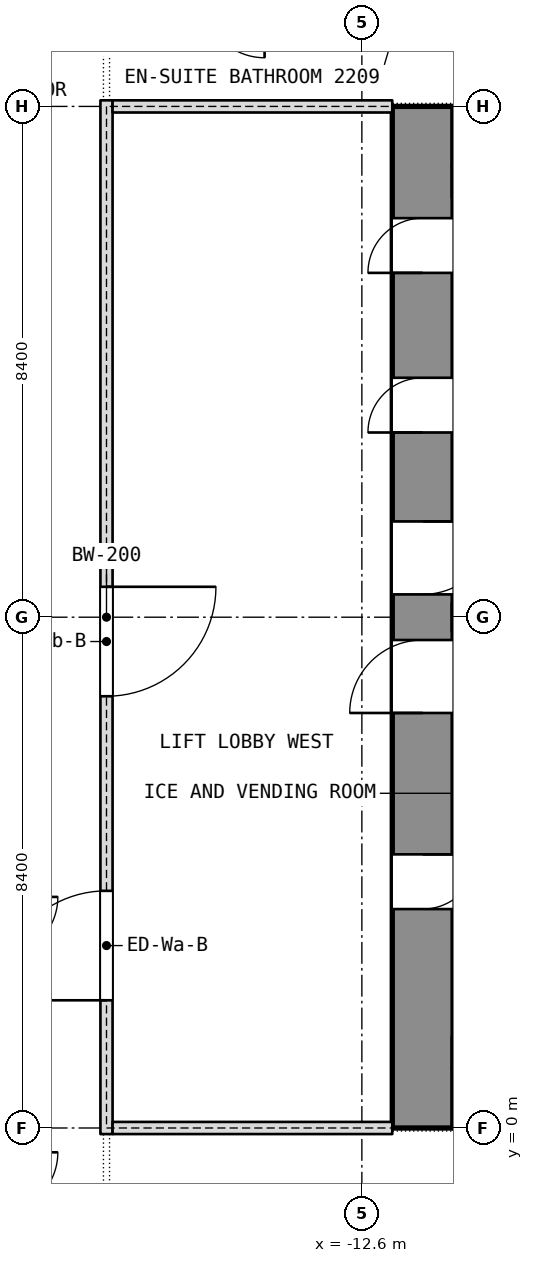
"""IFC4 building model, lengths in metres.
Left out: names, types, materials, properties, quantities, classifications, styles, units other than length and angle.
Written with IfcOpenShell. Run it as: python <this file> out.ifc"""

import sys

from ifc_helpers import new_model, si_unit, direction, frame, frame_2d, origin, place, context, subcontext, project, spatial, rectangle, extrude, element, fill, save


model = new_model("IFC4")
c1 = context("Model", 3, precision=1e-05, world=origin(), true_north=direction((0.0, 1.0)))
c2 = subcontext(c1, "Body", "Model", "MODEL_VIEW")
j1 = project(units=[si_unit("LENGTHUNIT", "METRE"), si_unit("PLANEANGLEUNIT", "RADIAN")], contexts=[c1])
p1 = place(None, origin())
s1 = spatial("IfcSite", under=j1, at=p1, CompositionType="ELEMENT")
p2 = place(p1, origin())
s2 = spatial("IfcBuilding", under=s1, at=p2, CompositionType="ELEMENT")
p3 = place(p2, frame((0.0, 0.0, 104.9)))
s3 = spatial("IfcBuildingStorey", under=s2, at=p3, CompositionType="ELEMENT", Elevation=104.9)
p4 = place(p3, frame((-11.6, 0.0, 0.0), z_axis=(0.0, 0.0, 1.0), x_axis=(0.0, 1.0, 0.0)))
e1 = element("IfcWall", 1, at=p4, inside=s3, PredefinedType="SHEAR", context=c2, shape_type="SweptSolid", body=[
    extrude(rectangle(XDim=16.8, YDim=1.0, at=frame_2d((8.4, 0.0))), origin(), (0.0, 0.0, 1.0), 3.6),
])
p5 = place(p4, frame((3.6, 0.0, 0.0)))
e2 = element("IfcOpeningElement", 2, at=p5, cuts=e1, PredefinedType="OPENING", context=c2, shape_type="SweptSolid", body=[
    extrude(rectangle(XDim=0.9, YDim=2.1, at=frame_2d((0.45, 1.05))), frame((0.0, 0.5, 0.0), z_axis=(0.0, -1.0, 0.0), x_axis=(1.0, 0.0, 0.0)), (0.0, 0.0, 1.0), 1.0),
])
p6 = place(p4, frame((6.825, 0.0, 0.0)))
e3 = element("IfcOpeningElement", 3, at=p6, cuts=e1, PredefinedType="OPENING", context=c2, shape_type="SweptSolid", body=[
    extrude(rectangle(XDim=1.2, YDim=2.1, at=frame_2d((0.6, 1.05))), frame((0.0, 0.5, 0.0), z_axis=(0.0, -1.0, 0.0), x_axis=(1.0, 0.0, 0.0)), (0.0, 0.0, 1.0), 1.0),
])
p7 = place(p4, frame((14.062, 0.0, 0.0)))
e4 = element("IfcOpeningElement", 4, at=p7, cuts=e1, PredefinedType="OPENING", context=c2, shape_type="SweptSolid", body=[
    extrude(rectangle(XDim=0.9, YDim=2.1, at=frame_2d((0.45, 1.05))), frame((0.0, 0.5, 0.0), z_axis=(0.0, -1.0, 0.0), x_axis=(1.0, 0.0, 0.0)), (0.0, 0.0, 1.0), 1.0),
])
p8 = place(p4, frame((11.438, 0.0, 0.0)))
e5 = element("IfcOpeningElement", 5, at=p8, cuts=e1, PredefinedType="OPENING", context=c2, shape_type="SweptSolid", body=[
    extrude(rectangle(XDim=0.9, YDim=2.1, at=frame_2d((0.45, 1.05))), frame((0.0, 0.5, 0.0), z_axis=(0.0, -1.0, 0.0), x_axis=(1.0, 0.0, 0.0)), (0.0, 0.0, 1.0), 1.0),
])
p9 = place(p4, frame((8.775, 0.0, 0.0)))
e6 = element("IfcOpeningElement", 6, at=p9, cuts=e1, PredefinedType="OPENING", context=c2, shape_type="SweptSolid", body=[
    extrude(rectangle(XDim=1.2, YDim=2.1, at=frame_2d((0.6, 1.05))), frame((0.0, 0.5, 0.0), z_axis=(0.0, -1.0, 0.0), x_axis=(1.0, 0.0, 0.0)), (0.0, 0.0, 1.0), 1.0),
])
p10 = place(p3, frame((-11.1, 8.4, 0.0), z_axis=(0.0, 0.0, 1.0), x_axis=(1.0, 0.0, 0.0)))
e7 = element("IfcWall", 7, at=p10, inside=s3, PredefinedType="SHEAR", context=c2, shape_type="SweptSolid", body=[
    extrude(rectangle(XDim=6.675, YDim=0.45, at=frame_2d((3.337, 0.0))), origin(), (0.0, 0.0, 1.0), 3.6),
])
p11 = place(p3, frame((-16.8, -0.1, 0.0), z_axis=(0.0, 0.0, 1.0), x_axis=(0.0, 1.0, 0.0)))
e8 = element("IfcWall", 8, at=p11, inside=s3, PredefinedType="PARTITIONING", context=c2, shape_type="SweptSolid", body=[
    extrude(rectangle(XDim=17.0, YDim=0.2, at=frame_2d((8.5, 0.0))), origin(), (0.0, 0.0, 1.0), 3.34),
])
p12 = place(p11, frame((2.2, 0.0, 0.0)))
e9 = element("IfcOpeningElement", 9, at=p12, cuts=e8, PredefinedType="OPENING", context=c2, shape_type="SweptSolid", body=[
    extrude(rectangle(XDim=1.8, YDim=2.1, at=frame_2d((0.9, 1.05))), frame((0.0, 0.1, 0.0), z_axis=(0.0, -1.0, 0.0), x_axis=(1.0, 0.0, 0.0)), (0.0, 0.0, 1.0), 0.2),
])
p13 = place(p11, frame((7.2, 0.0, 0.0)))
e10 = element("IfcOpeningElement", 10, at=p13, cuts=e8, PredefinedType="OPENING", context=c2, shape_type="SweptSolid", body=[
    extrude(rectangle(XDim=1.8, YDim=2.1, at=frame_2d((0.9, 1.05))), frame((0.0, 0.1, 0.0), z_axis=(0.0, -1.0, 0.0), x_axis=(1.0, 0.0, 0.0)), (0.0, 0.0, 1.0), 0.2),
])
for number, where, z_axis, x_axis in (
    (11, (-16.7, 0.0, 0.0), (0.0, 0.0, 1.0), (1.0, 0.0, 0.0)),
    (12, (-16.7, 16.8, 0.0), (0.0, 0.0, 1.0), (1.0, 0.0, 0.0)),
):
    element("IfcWall", number, at=place(p3, frame(where, z_axis=z_axis, x_axis=x_axis)), inside=s3, PredefinedType="PARTITIONING", context=c2, shape_type="SweptSolid", body=[
        extrude(rectangle(XDim=4.6, YDim=0.2, at=frame_2d((2.3, 0.0))), origin(), (0.0, 0.0, 1.0), 2.89),
    ])
p14 = place(p5, origin())
e13 = element("IfcDoor", 13, at=p14, inside=s3, OperationType="SINGLE_SWING_LEFT", PredefinedType="DOOR", context=c2, shape_type="SweptSolid", body=[
    extrude(rectangle(XDim=0.9, YDim=2.1, at=frame_2d((0.45, 1.05))), frame((0.0, 0.025, 0.0), z_axis=(0.0, -1.0, 0.0), x_axis=(1.0, 0.0, 0.0)), (0.0, 0.0, 1.0), 0.05),
])
fill(e2, e13)
p15 = place(p6, origin())
e14 = element("IfcDoor", 14, at=p15, inside=s3, OperationType="SINGLE_SWING_LEFT", PredefinedType="DOOR", context=c2, shape_type="SweptSolid", body=[
    extrude(rectangle(XDim=1.2, YDim=2.1, at=frame_2d((0.6, 1.05))), frame((0.0, 0.025, 0.0), z_axis=(0.0, -1.0, 0.0), x_axis=(1.0, 0.0, 0.0)), (0.0, 0.0, 1.0), 0.05),
])
fill(e3, e14)
p16 = place(p7, origin())
e15 = element("IfcDoor", 15, at=p16, inside=s3, OperationType="SINGLE_SWING_LEFT", PredefinedType="DOOR", context=c2, shape_type="SweptSolid", body=[
    extrude(rectangle(XDim=0.9, YDim=2.1, at=frame_2d((0.45, 1.05))), frame((0.0, 0.025, 0.0), z_axis=(0.0, -1.0, 0.0), x_axis=(1.0, 0.0, 0.0)), (0.0, 0.0, 1.0), 0.05),
])
fill(e4, e15)
p17 = place(p8, origin())
e16 = element("IfcDoor", 16, at=p17, inside=s3, OperationType="SINGLE_SWING_LEFT", PredefinedType="DOOR", context=c2, shape_type="SweptSolid", body=[
    extrude(rectangle(XDim=0.9, YDim=2.1, at=frame_2d((0.45, 1.05))), frame((0.0, 0.025, 0.0), z_axis=(0.0, -1.0, 0.0), x_axis=(1.0, 0.0, 0.0)), (0.0, 0.0, 1.0), 0.05),
])
fill(e5, e16)
p18 = place(p9, origin())
e17 = element("IfcDoor", 17, at=p18, inside=s3, OperationType="SINGLE_SWING_LEFT", PredefinedType="DOOR", context=c2, shape_type="SweptSolid", body=[
    extrude(rectangle(XDim=1.2, YDim=2.1, at=frame_2d((0.6, 1.05))), frame((0.0, 0.025, 0.0), z_axis=(0.0, -1.0, 0.0), x_axis=(1.0, 0.0, 0.0)), (0.0, 0.0, 1.0), 0.05),
])
fill(e6, e17)
p19 = place(p12, origin())
e18 = element("IfcDoor", 18, at=p19, inside=s3, OperationType="DOUBLE_DOOR_SINGLE_SWING", PredefinedType="DOOR", context=c2, shape_type="SweptSolid", body=[
    extrude(rectangle(XDim=1.8, YDim=2.1, at=frame_2d((0.9, 1.05))), frame((0.0, 0.025, 0.0), z_axis=(0.0, -1.0, 0.0), x_axis=(1.0, 0.0, 0.0)), (0.0, 0.0, 1.0), 0.05),
])
fill(e9, e18)
p20 = place(p13, origin())
e19 = element("IfcDoor", 19, at=p20, inside=s3, OperationType="DOUBLE_DOOR_SINGLE_SWING", PredefinedType="DOOR", context=c2, shape_type="SweptSolid", body=[
    extrude(rectangle(XDim=1.8, YDim=2.1, at=frame_2d((0.9, 1.05))), frame((0.0, 0.025, 0.0), z_axis=(0.0, -1.0, 0.0), x_axis=(1.0, 0.0, 0.0)), (0.0, 0.0, 1.0), 0.05),
])
fill(e10, e19)
save(model, sys.argv[1])
